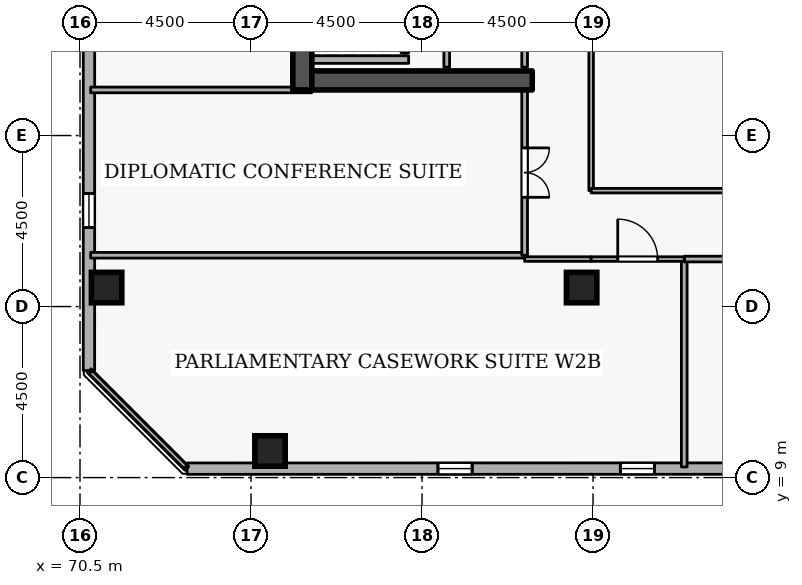
"""IFC4 building model, lengths in metres.
Left out: names, types, materials, properties, quantities, classifications, styles, units other than length and angle.
Written with IfcOpenShell. Run it as: python <this file> out.ifc"""

import sys

from ifc_helpers import new_model, si_unit, direction, frame, frame_2d, origin, origin_2d, place, context, subcontext, project, spatial, rectangle, extrude, element, fill, save


model = new_model("IFC4")
c1 = context("Model", 3, precision=1e-05, world=origin(), true_north=direction((0.0, 1.0)))
c2 = subcontext(c1, "Body", "Model", "MODEL_VIEW")
j1 = project(units=[si_unit("LENGTHUNIT", "METRE"), si_unit("PLANEANGLEUNIT", "RADIAN")], contexts=[c1])
p1 = place(None, origin())
s1 = spatial("IfcSite", under=j1, at=p1, CompositionType="ELEMENT")
p2 = place(p1, origin())
s2 = spatial("IfcBuilding", under=s1, at=p2, CompositionType="ELEMENT")
p3 = place(p2, frame((0.0, 0.0, 261.9)))
s3 = spatial("IfcBuildingStorey", under=s2, at=p3, CompositionType="ELEMENT", Elevation=261.9)
p4 = place(p3, frame((76.35, 19.2, 0.0), z_axis=(0.0, 0.0, 1.0), x_axis=(0.0, 1.0, 0.0)))
e1 = element("IfcWall", 1, at=p4, inside=s3, PredefinedType="SHEAR", context=c2, shape_type="SweptSolid", body=[
    extrude(rectangle(XDim=15.6, YDim=0.5, at=frame_2d((7.8, 0.0))), origin(), (0.0, 0.0, 1.0), 3.6),
])
p5 = place(p3, frame((76.6, 19.45, 0.0), z_axis=(0.0, 0.0, 1.0), x_axis=(1.0, 0.0, 0.0)))
e2 = element("IfcWall", 2, at=p5, inside=s3, PredefinedType="SHEAR", context=c2, shape_type="SweptSolid", body=[
    extrude(rectangle(XDim=5.8, YDim=0.5, at=frame_2d((2.9, 0.0))), origin(), (0.0, 0.0, 1.0), 3.6),
])
for number, where, z_axis, x_axis in (
    (3, (71.2, 14.0, 0.0), (0.0, 0.0, 1.0), (1.0, 0.0, 0.0)),
    (4, (75.5, 9.7, 0.0), (0.0, 0.0, 1.0), (1.0, 0.0, 0.0)),
    (5, (83.7, 14.0, 0.0), (0.0, 0.0, 1.0), (1.0, 0.0, 0.0)),
):
    element("IfcColumn", number, at=place(p3, frame(where, z_axis=z_axis, x_axis=x_axis)), inside=s3, PredefinedType="COLUMN", context=c2, shape_type="SweptSolid", body=[
        extrude(rectangle(XDim=0.8, YDim=0.8, at=origin_2d()), origin(), (0.0, 0.0, 1.0), 3.6),
    ])
p6 = place(p3, frame((73.319, 9.235, 0.0), z_axis=(0.0, 0.0, 1.0), x_axis=(0.999999994606, 0.000103863011, 0.0)))
e6 = element("IfcWall", 6, at=p6, inside=s3, PredefinedType="STANDARD", context=c2, shape_type="SweptSolid", body=[
    extrude(rectangle(XDim=35.259, YDim=0.3, at=frame_2d((17.629, 0.0))), origin(), (0.0, 0.0, 1.0), 2.7),
])
p7 = place(p6, frame((6.6, 0.0, 0.72)))
e7 = element("IfcOpeningElement", 7, at=p7, cuts=e6, PredefinedType="OPENING", context=c2, shape_type="SweptSolid", body=[
    extrude(rectangle(XDim=0.9, YDim=1.75, at=frame_2d((0.45, 0.875))), frame((0.0, 0.16, 0.0), z_axis=(0.0, -1.0, 0.0), x_axis=(1.0, 0.0, 0.0)), (0.0, 0.0, 1.0), 0.32),
])
p8 = place(p6, frame((11.4, 0.0, 0.72)))
e8 = element("IfcOpeningElement", 8, at=p8, cuts=e6, PredefinedType="OPENING", context=c2, shape_type="SweptSolid", body=[
    extrude(rectangle(XDim=0.9, YDim=1.75, at=frame_2d((0.45, 0.875))), frame((0.0, 0.16, 0.0), z_axis=(0.0, -1.0, 0.0), x_axis=(1.0, 0.0, 0.0)), (0.0, 0.0, 1.0), 0.32),
])
p9 = place(p6, frame((21.0, 0.0, 0.72)))
e9 = element("IfcOpeningElement", 9, at=p9, cuts=e6, PredefinedType="OPENING", context=c2, shape_type="SweptSolid", body=[
    extrude(rectangle(XDim=0.9, YDim=1.75, at=frame_2d((0.45, 0.875))), frame((0.0, 0.16, 0.0), z_axis=(0.0, -1.0, 0.0), x_axis=(1.0, 0.0, 0.0)), (0.0, 0.0, 1.0), 0.32),
])
p10 = place(p6, frame((25.8, 0.0, 0.72)))
e10 = element("IfcOpeningElement", 10, at=p10, cuts=e6, PredefinedType="OPENING", context=c2, shape_type="SweptSolid", body=[
    extrude(rectangle(XDim=0.9, YDim=1.75, at=frame_2d((0.45, 0.875))), frame((0.0, 0.16, 0.0), z_axis=(0.0, -1.0, 0.0), x_axis=(1.0, 0.0, 0.0)), (0.0, 0.0, 1.0), 0.32),
])
p11 = place(p6, frame((30.6, 0.0, 0.72)))
e11 = element("IfcOpeningElement", 11, at=p11, cuts=e6, PredefinedType="OPENING", context=c2, shape_type="SweptSolid", body=[
    extrude(rectangle(XDim=0.9, YDim=1.75, at=frame_2d((0.45, 0.875))), frame((0.0, 0.16, 0.0), z_axis=(0.0, -1.0, 0.0), x_axis=(1.0, 0.0, 0.0)), (0.0, 0.0, 1.0), 0.32),
])
p12 = place(p3, frame((70.739, 47.078, 0.0), z_axis=(0.0, 0.0, 1.0), x_axis=(-0.000103863011, -0.999999994606, 0.0)))
e12 = element("IfcWall", 12, at=p12, inside=s3, PredefinedType="STANDARD", context=c2, shape_type="SweptSolid", body=[
    extrude(rectangle(XDim=35.259, YDim=0.3, at=frame_2d((17.629, 0.0))), origin(), (0.0, 0.0, 1.0), 2.7),
])
p13 = place(p12, frame((1.8, 0.0, 0.72)))
e13 = element("IfcOpeningElement", 13, at=p13, cuts=e12, PredefinedType="OPENING", context=c2, shape_type="SweptSolid", body=[
    extrude(rectangle(XDim=0.9, YDim=1.75, at=frame_2d((0.45, 0.875))), frame((0.0, 0.16, 0.0), z_axis=(0.0, -1.0, 0.0), x_axis=(1.0, 0.0, 0.0)), (0.0, 0.0, 1.0), 0.32),
])
p14 = place(p12, frame((11.4, 0.0, 0.72)))
e14 = element("IfcOpeningElement", 14, at=p14, cuts=e12, PredefinedType="OPENING", context=c2, shape_type="SweptSolid", body=[
    extrude(rectangle(XDim=0.9, YDim=1.75, at=frame_2d((0.45, 0.875))), frame((0.0, 0.16, 0.0), z_axis=(0.0, -1.0, 0.0), x_axis=(1.0, 0.0, 0.0)), (0.0, 0.0, 1.0), 0.32),
])
p15 = place(p12, frame((16.2, 0.0, 0.72)))
e15 = element("IfcOpeningElement", 15, at=p15, cuts=e12, PredefinedType="OPENING", context=c2, shape_type="SweptSolid", body=[
    extrude(rectangle(XDim=0.9, YDim=1.75, at=frame_2d((0.45, 0.875))), frame((0.0, 0.16, 0.0), z_axis=(0.0, -1.0, 0.0), x_axis=(1.0, 0.0, 0.0)), (0.0, 0.0, 1.0), 0.32),
])
p16 = place(p12, frame((25.8, 0.0, 0.72)))
e16 = element("IfcOpeningElement", 16, at=p16, cuts=e12, PredefinedType="OPENING", context=c2, shape_type="SweptSolid", body=[
    extrude(rectangle(XDim=0.9, YDim=1.75, at=frame_2d((0.45, 0.875))), frame((0.0, 0.16, 0.0), z_axis=(0.0, -1.0, 0.0), x_axis=(1.0, 0.0, 0.0)), (0.0, 0.0, 1.0), 0.32),
])
p17 = place(p12, frame((30.6, 0.0, 0.72)))
e17 = element("IfcOpeningElement", 17, at=p17, cuts=e12, PredefinedType="OPENING", context=c2, shape_type="SweptSolid", body=[
    extrude(rectangle(XDim=0.9, YDim=1.75, at=frame_2d((0.45, 0.875))), frame((0.0, 0.16, 0.0), z_axis=(0.0, -1.0, 0.0), x_axis=(1.0, 0.0, 0.0)), (0.0, 0.0, 1.0), 0.32),
])
p18 = place(p3, frame((79.05, 20.18, 0.0), z_axis=(0.0, 0.0, 1.0), x_axis=(0.0, 1.0, 0.0)))
e18 = element("IfcWall", 18, at=p18, inside=s3, PredefinedType="STANDARD", context=c2, shape_type="SweptSolid", body=[
    extrude(rectangle(XDim=1.94, YDim=0.2, at=frame_2d((0.97, 0.0))), origin(), (0.0, 0.0, 1.0), 3.34),
])
p19 = place(p18, frame((0.46, 0.0, 0.0)))
e19 = element("IfcOpeningElement", 19, at=p19, cuts=e18, PredefinedType="OPENING", context=c2, shape_type="SweptSolid", body=[
    extrude(rectangle(XDim=1.02, YDim=2.06, at=frame_2d((0.51, 1.03))), frame((0.0, 0.11, 0.0), z_axis=(0.0, -1.0, 0.0), x_axis=(1.0, 0.0, 0.0)), (0.0, 0.0, 1.0), 0.22),
])
p20 = place(p3, frame((76.612, 20.0, 0.0), z_axis=(0.0, 0.0, 1.0), x_axis=(1.0, 0.0, 0.0)))
e20 = element("IfcWall", 20, at=p20, inside=s3, PredefinedType="STANDARD", context=c2, shape_type="SweptSolid", body=[
    extrude(rectangle(XDim=2.536, YDim=0.2, at=frame_2d((1.268, 0.0))), origin(), (0.0, 0.0, 1.0), 3.34),
])
p21 = place(p3, frame((82.2, 19.8, 0.0), z_axis=(0.0, 0.0, 1.0), x_axis=(0.0, 1.0, 0.0)))
e21 = element("IfcWall", 21, at=p21, inside=s3, PredefinedType="PARTITIONING", context=c2, shape_type="SweptSolid", body=[
    extrude(rectangle(XDim=3.3, YDim=0.15, at=frame_2d((1.65, 0.0))), origin(), (0.0, 0.0, 1.0), 3.34),
])
p22 = place(p21, frame((1.19, 0.0, 0.0)))
e22 = element("IfcOpeningElement", 22, at=p22, cuts=e21, PredefinedType="OPENING", context=c2, shape_type="SweptSolid", body=[
    extrude(rectangle(XDim=0.92, YDim=2.08, at=frame_2d((0.46, 1.04))), frame((0.0, 0.085, 0.0), z_axis=(0.0, -1.0, 0.0), x_axis=(1.0, 0.0, 0.0)), (0.0, 0.0, 1.0), 0.17),
])
p23 = place(p3, frame((80.15, 23.1, 0.0), z_axis=(0.0, 0.0, 1.0), x_axis=(0.0, -1.0, 0.0)))
e23 = element("IfcWall", 23, at=p23, inside=s3, PredefinedType="PARTITIONING", context=c2, shape_type="SweptSolid", body=[
    extrude(rectangle(XDim=3.3, YDim=0.15, at=frame_2d((1.65, 0.0))), origin(), (0.0, 0.0, 1.0), 3.34),
])
p24 = place(p3, frame((82.2, 14.85, 0.0), z_axis=(0.0, 0.0, 1.0), x_axis=(-1.0, 0.0, 0.0)))
e24 = element("IfcWall", 24, at=p24, inside=s3, PredefinedType="PARTITIONING", context=c2, shape_type="SweptSolid", body=[
    extrude(rectangle(XDim=11.42, YDim=0.15, at=frame_2d((5.71, 0.0))), origin(), (0.0, 0.0, 1.0), 3.34),
])
p25 = place(p3, frame((70.78, 19.2, 0.0), z_axis=(0.0, 0.0, 1.0), x_axis=(1.0, 0.0, 0.0)))
e25 = element("IfcWall", 25, at=p25, inside=s3, PredefinedType="PARTITIONING", context=c2, shape_type="SweptSolid", body=[
    extrude(rectangle(XDim=5.82, YDim=0.15, at=frame_2d((2.91, 0.0))), origin(), (0.0, 0.0, 1.0), 2.545),
])
p26 = place(p3, frame((82.2, 19.2, 0.0), z_axis=(0.0, 0.0, 1.0), x_axis=(0.0, -1.0, 0.0)))
e26 = element("IfcWall", 26, at=p26, inside=s3, PredefinedType="PARTITIONING", context=c2, shape_type="SweptSolid", body=[
    extrude(rectangle(XDim=4.35, YDim=0.15, at=frame_2d((2.175, 0.0))), origin(), (0.0, 0.0, 1.0), 3.34),
])
p27 = place(p26, frame((1.525, 0.0, 0.0)))
e27 = element("IfcOpeningElement", 27, at=p27, cuts=e26, PredefinedType="OPENING", context=c2, shape_type="SweptSolid", body=[
    extrude(rectangle(XDim=1.3, YDim=2.12, at=frame_2d((0.65, 1.06))), frame((0.0, 0.085, 0.0), z_axis=(0.0, -1.0, 0.0), x_axis=(1.0, 0.0, 0.0)), (0.0, 0.0, 1.0), 0.17),
])
p28 = place(p3, frame((86.4, 9.28, 0.0), z_axis=(0.0, 0.0, 1.0), x_axis=(0.0, 1.0, 0.0)))
e28 = element("IfcWall", 28, at=p28, inside=s3, PredefinedType="PARTITIONING", context=c2, shape_type="SweptSolid", body=[
    extrude(rectangle(XDim=5.47, YDim=0.15, at=frame_2d((2.735, 0.0))), origin(), (0.0, 0.0, 1.0), 3.34),
])
p29 = place(p3, frame((86.4, 14.75, 0.0), z_axis=(0.0, 0.0, 1.0), x_axis=(1.0, 0.0, 0.0)))
e29 = element("IfcWall", 29, at=p29, inside=s3, PredefinedType="PARTITIONING", context=c2, shape_type="SweptSolid", body=[
    extrude(rectangle(XDim=4.2, YDim=0.15, at=frame_2d((2.1, 0.0))), origin(), (0.0, 0.0, 1.0), 3.34),
])
p30 = place(p29, frame((1.45, 0.0, 0.0)))
e30 = element("IfcOpeningElement", 30, at=p30, cuts=e29, PredefinedType="OPENING", context=c2, shape_type="SweptSolid", body=[
    extrude(rectangle(XDim=1.3, YDim=2.12, at=frame_2d((0.65, 1.06))), frame((0.0, 0.085, 0.0), z_axis=(0.0, -1.0, 0.0), x_axis=(1.0, 0.0, 0.0)), (0.0, 0.0, 1.0), 0.17),
])
p31 = place(p3, frame((73.275, 9.28, 0.0), z_axis=(0.0, 0.0, 1.0), x_axis=(-0.707106781187, 0.707106781187, 0.0)))
e31 = element("IfcWall", 31, at=p31, inside=s3, PredefinedType="PARTITIONING", context=c2, shape_type="SweptSolid", body=[
    extrude(rectangle(XDim=3.528, YDim=0.12, at=frame_2d((1.764, 0.0))), origin(), (0.0, 0.0, 1.0), 3.34),
])
p32 = place(p3, frame((82.2, 14.75, 0.0), z_axis=(0.0, 0.0, 1.0), x_axis=(1.0, 0.0, 0.0)))
e32 = element("IfcWall", 32, at=p32, inside=s3, PredefinedType="PARTITIONING", context=c2, shape_type="SweptSolid", body=[
    extrude(rectangle(XDim=1.75, YDim=0.12, at=frame_2d((0.875, 0.0))), origin(), (0.0, 0.0, 1.0), 3.34),
])
p33 = place(p3, frame((83.95, 14.75, 0.0), z_axis=(0.0, 0.0, 1.0), x_axis=(1.0, 0.0, 0.0)))
e33 = element("IfcWall", 33, at=p33, inside=s3, PredefinedType="PARTITIONING", context=c2, shape_type="SweptSolid", body=[
    extrude(rectangle(XDim=2.45, YDim=0.12, at=frame_2d((1.225, 0.0))), origin(), (0.0, 0.0, 1.0), 3.34),
])
p34 = place(p33, frame((0.7, 0.0, 0.0)))
e34 = element("IfcOpeningElement", 34, at=p34, cuts=e33, PredefinedType="OPENING", context=c2, shape_type="SweptSolid", body=[
    extrude(rectangle(XDim=1.05, YDim=2.1, at=frame_2d((0.525, 1.05))), frame((0.0, 0.07, 0.0), z_axis=(0.0, -1.0, 0.0), x_axis=(1.0, 0.0, 0.0)), (0.0, 0.0, 1.0), 0.14),
])
p35 = place(p3, frame((83.95, 16.55, 0.0), z_axis=(0.0, 0.0, 1.0), x_axis=(0.0, 1.0, 0.0)))
e35 = element("IfcWall", 35, at=p35, inside=s3, PredefinedType="PARTITIONING", context=c2, shape_type="SweptSolid", body=[
    extrude(rectangle(XDim=5.85, YDim=0.12, at=frame_2d((2.925, 0.0))), origin(), (0.0, 0.0, 1.0), 3.34),
])
p36 = place(p3, frame((93.05, 16.55, 0.0), z_axis=(0.0, 0.0, 1.0), x_axis=(-1.0, 0.0, 0.0)))
e36 = element("IfcWall", 36, at=p36, inside=s3, PredefinedType="PARTITIONING", context=c2, shape_type="SweptSolid", body=[
    extrude(rectangle(XDim=9.1, YDim=0.12, at=frame_2d((4.55, 0.0))), origin(), (0.0, 0.0, 1.0), 3.34),
])
p37 = place(p36, frame((4.075, 0.0, 0.0)))
e37 = element("IfcOpeningElement", 37, at=p37, cuts=e36, PredefinedType="OPENING", context=c2, shape_type="SweptSolid", body=[
    extrude(rectangle(XDim=0.95, YDim=2.1, at=frame_2d((0.475, 1.05))), frame((0.0, 0.07, 0.0), z_axis=(0.0, -1.0, 0.0), x_axis=(1.0, 0.0, 0.0)), (0.0, 0.0, 1.0), 0.14),
])
p38 = place(p7, origin())
e38 = element("IfcWindow", 38, at=p38, inside=s3, PartitioningType="SINGLE_PANEL", PredefinedType="WINDOW", context=c2, shape_type="SweptSolid", body=[
    extrude(rectangle(XDim=0.9, YDim=1.75, at=frame_2d((0.45, 0.875))), frame((0.0, 0.03, 0.0), z_axis=(0.0, -1.0, 0.0), x_axis=(1.0, 0.0, 0.0)), (0.0, 0.0, 1.0), 0.06),
])
fill(e7, e38)
p39 = place(p8, origin())
e39 = element("IfcWindow", 39, at=p39, inside=s3, PartitioningType="SINGLE_PANEL", PredefinedType="WINDOW", context=c2, shape_type="SweptSolid", body=[
    extrude(rectangle(XDim=0.9, YDim=1.75, at=frame_2d((0.45, 0.875))), frame((0.0, 0.03, 0.0), z_axis=(0.0, -1.0, 0.0), x_axis=(1.0, 0.0, 0.0)), (0.0, 0.0, 1.0), 0.06),
])
fill(e8, e39)
p40 = place(p17, origin())
e40 = element("IfcWindow", 40, at=p40, inside=s3, PartitioningType="SINGLE_PANEL", PredefinedType="WINDOW", context=c2, shape_type="SweptSolid", body=[
    extrude(rectangle(XDim=0.9, YDim=1.75, at=frame_2d((0.45, 0.875))), frame((0.0, 0.03, 0.0), z_axis=(0.0, -1.0, 0.0), x_axis=(1.0, 0.0, 0.0)), (0.0, 0.0, 1.0), 0.06),
])
fill(e17, e40)
p41 = place(p27, origin())
e41 = element("IfcDoor", 41, at=p41, inside=s3, OperationType="DOUBLE_DOOR_SINGLE_SWING", PredefinedType="DOOR", context=c2, shape_type="SweptSolid", body=[
    extrude(rectangle(XDim=1.3, YDim=2.12, at=frame_2d((0.65, 1.06))), frame((0.0, 0.025, 0.0), z_axis=(0.0, -1.0, 0.0), x_axis=(1.0, 0.0, 0.0)), (0.0, 0.0, 1.0), 0.05),
])
fill(e27, e41)
p42 = place(p34, origin())
e42 = element("IfcDoor", 42, at=p42, inside=s3, OperationType="SINGLE_SWING_LEFT", PredefinedType="DOOR", context=c2, shape_type="SweptSolid", body=[
    extrude(rectangle(XDim=1.05, YDim=2.1, at=frame_2d((0.525, 1.05))), frame((0.0, 0.025, 0.0), z_axis=(0.0, -1.0, 0.0), x_axis=(1.0, 0.0, 0.0)), (0.0, 0.0, 1.0), 0.05),
])
fill(e34, e42)
save(model, sys.argv[1])
